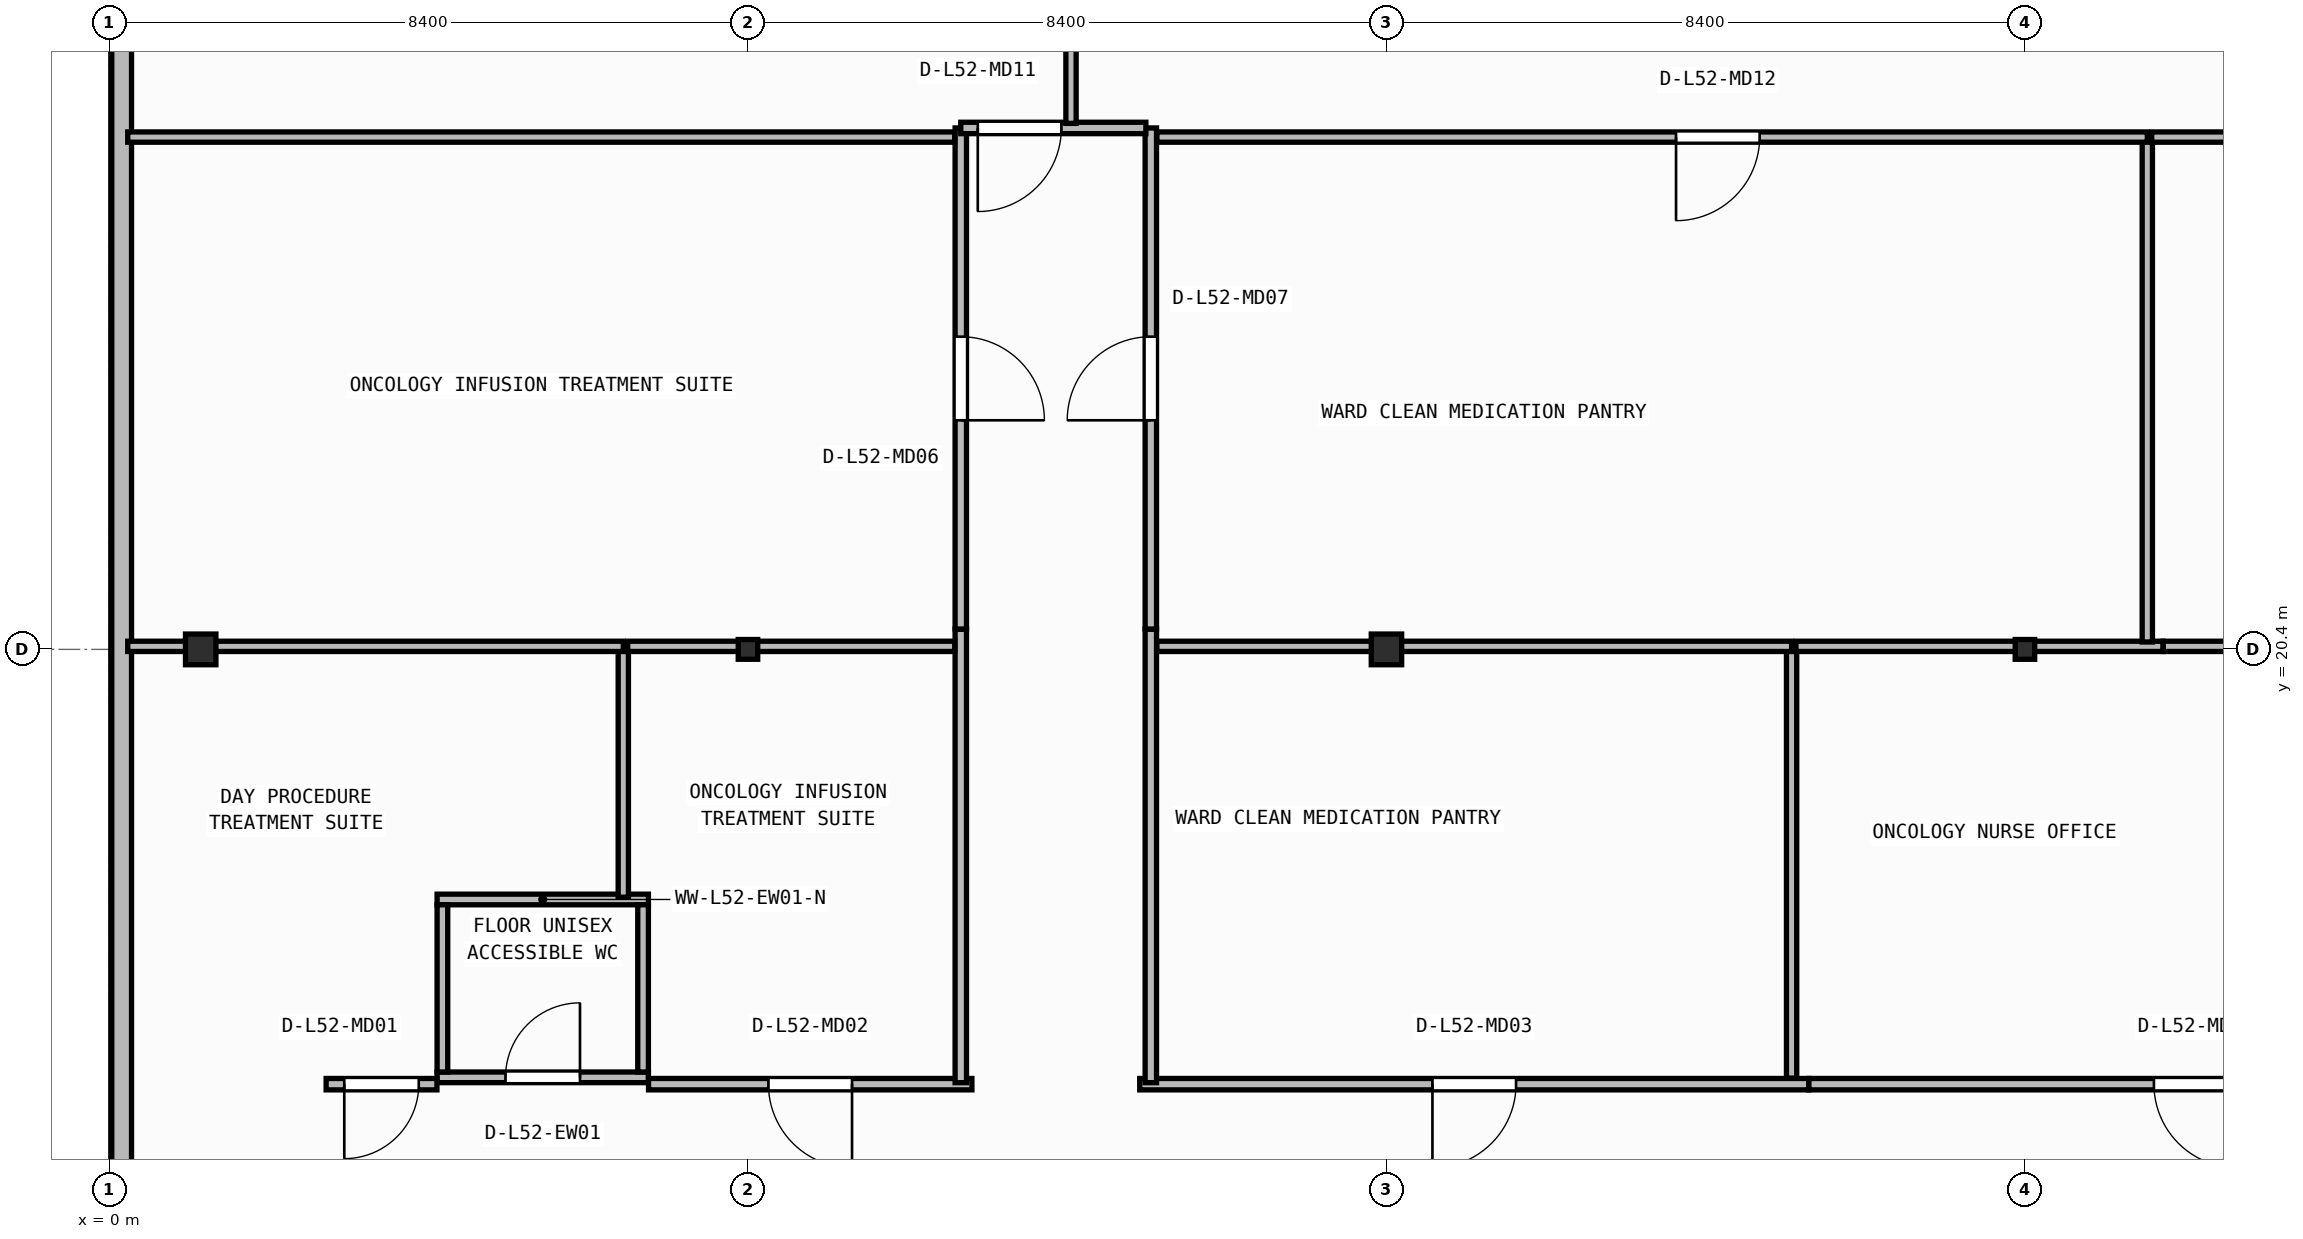
"""IFC4 building model, lengths in metres.
Left out: names, types, materials, properties, quantities, classifications, styles, units other than length and angle.
Written with IfcOpenShell. Run it as: python <this file> out.ifc"""

import sys

from ifc_helpers import new_model, si_unit, direction, frame, frame_2d, origin, origin_2d, place, context, subcontext, project, spatial, rectangle, i_section, extrude, element, fill, save


model = new_model("IFC4")
c1 = context("Model", 3, precision=1e-05, world=origin(), true_north=direction((0.0, 1.0)))
c2 = subcontext(c1, "Body", "Model", "MODEL_VIEW")
j1 = project(units=[si_unit("LENGTHUNIT", "METRE"), si_unit("PLANEANGLEUNIT", "RADIAN")], contexts=[c1])
p1 = place(None, origin())
s1 = spatial("IfcSite", under=j1, at=p1, CompositionType="ELEMENT")
p2 = place(p1, origin())
s2 = spatial("IfcBuilding", under=s1, at=p2, CompositionType="ELEMENT")
p3 = place(p2, frame((0.0, 0.0, 211.85)))
s3 = spatial("IfcBuildingStorey", under=s2, at=p3, CompositionType="ELEMENT", Elevation=211.85)
p4 = place(p3, frame((1.2, 20.4, 0.0), z_axis=(0.0, 0.0, 1.0), x_axis=(1.0, 0.0, 0.0)))
e1 = element("IfcColumn", 1, at=p4, inside=s3, PredefinedType="COLUMN", context=c2, shape_type="SweptSolid", body=[
    extrude(i_section(OverallWidth=0.4, OverallDepth=0.404, WebThickness=0.02, FlangeThickness=0.032, at=origin_2d()), origin(), (0.0, 0.0, 1.0), 3.95),
])
p5 = place(p3, frame((8.4, 20.4, 0.0), z_axis=(0.0, 0.0, 1.0), x_axis=(1.0, 0.0, 0.0)))
e2 = element("IfcColumn", 2, at=p5, inside=s3, PredefinedType="COLUMN", context=c2, shape_type="SweptSolid", body=[
    extrude(i_section(OverallWidth=0.256, OverallDepth=0.26, WebThickness=0.01, FlangeThickness=0.017, FilletRadius=0.013, at=origin_2d()), origin(), (0.0, 0.0, 1.0), 3.95),
])
p6 = place(p3, frame((16.8, 20.4, 0.0), z_axis=(0.0, 0.0, 1.0), x_axis=(1.0, 0.0, 0.0)))
e3 = element("IfcColumn", 3, at=p6, inside=s3, PredefinedType="COLUMN", context=c2, shape_type="SweptSolid", body=[
    extrude(i_section(OverallWidth=0.4, OverallDepth=0.404, WebThickness=0.02, FlangeThickness=0.032, at=origin_2d()), origin(), (0.0, 0.0, 1.0), 3.95),
])
p7 = place(p3, frame((25.2, 20.4, 0.0), z_axis=(0.0, 0.0, 1.0), x_axis=(1.0, 0.0, 0.0)))
e4 = element("IfcColumn", 4, at=p7, inside=s3, PredefinedType="COLUMN", context=c2, shape_type="SweptSolid", body=[
    extrude(i_section(OverallWidth=0.256, OverallDepth=0.26, WebThickness=0.01, FlangeThickness=0.017, FilletRadius=0.013, at=origin_2d()), origin(), (0.0, 0.0, 1.0), 3.95),
])
p8 = place(p3, frame((0.16, 40.14, 0.0), z_axis=(0.0, 0.0, 1.0), x_axis=(0.0, -1.0, 0.0)))
e5 = element("IfcWall", 5, at=p8, inside=s3, PredefinedType="STANDARD", context=c2, shape_type="SweptSolid", body=[
    extrude(rectangle(XDim=37.48, YDim=0.26, at=frame_2d((18.74, 0.0))), origin(), (0.0, 0.0, 1.0), 3.71),
])
p9 = place(p8, frame((27.4, 0.0, 0.9)))
e6 = element("IfcOpeningElement", 6, at=p9, cuts=e5, PredefinedType="OPENING", context=c2, shape_type="SweptSolid", body=[
    extrude(rectangle(XDim=2.4, YDim=1.65, at=frame_2d((1.2, 0.825))), frame((0.0, 0.14, 0.0), z_axis=(0.0, -1.0, 0.0), x_axis=(1.0, 0.0, 0.0)), (0.0, 0.0, 1.0), 0.28),
])
p10 = place(p3, frame((4.31, 14.77, 0.0), z_axis=(0.0, 0.0, 1.0), x_axis=(1.0, 0.0, 0.0)))
e7 = element("IfcWall", 7, at=p10, inside=s3, PredefinedType="PARTITIONING", context=c2, shape_type="SweptSolid", body=[
    extrude(rectangle(XDim=2.78, YDim=0.14, at=frame_2d((1.39, 0.0))), origin(), (0.0, 0.0, 1.0), 3.71),
])
p11 = place(p10, frame((0.9, 0.0, 0.0)))
e8 = element("IfcOpeningElement", 8, at=p11, cuts=e7, PredefinedType="OPENING", context=c2, shape_type="SweptSolid", body=[
    extrude(rectangle(XDim=0.98, YDim=2.1, at=frame_2d((0.49, 1.05))), frame((0.0, 0.08, 0.0), z_axis=(0.0, -1.0, 0.0), x_axis=(1.0, 0.0, 0.0)), (0.0, 0.0, 1.0), 0.16),
])
p12 = place(p3, frame((4.31, 17.11, 0.0), z_axis=(0.0, 0.0, 1.0), x_axis=(1.0, 0.0, 0.0)))
e9 = element("IfcWall", 9, at=p12, inside=s3, PredefinedType="PARTITIONING", context=c2, shape_type="SweptSolid", body=[
    extrude(rectangle(XDim=2.78, YDim=0.14, at=frame_2d((1.39, 0.0))), origin(), (0.0, 0.0, 1.0), 3.71),
])
for number, where, z_axis, x_axis in (
    (10, (4.38, 14.84, 0.0), (0.0, 0.0, 1.0), (0.0, 1.0, 0.0)),
    (11, (7.02, 14.84, 0.0), (0.0, 0.0, 1.0), (0.0, 1.0, 0.0)),
):
    element("IfcWall", number, at=place(p3, frame(where, z_axis=z_axis, x_axis=x_axis)), inside=s3, PredefinedType="PARTITIONING", context=c2, shape_type="SweptSolid", body=[
        extrude(rectangle(XDim=2.2, YDim=0.14, at=frame_2d((1.1, 0.0))), origin(), (0.0, 0.0, 1.0), 3.71),
    ])
p13 = place(p3, frame((4.308, 14.68, 0.0), z_axis=(0.0, 0.0, 1.0), x_axis=(-1.0, 0.0, 0.0)))
e12 = element("IfcWall", 12, at=p13, inside=s3, PredefinedType="PARTITIONING", context=c2, shape_type="SweptSolid", body=[
    extrude(rectangle(XDim=1.458, YDim=0.15, at=frame_2d((0.729, 0.0))), origin(), (0.0, 0.0, 1.0), 3.71),
])
p14 = place(p13, frame((0.239, 0.0, 0.0)))
e13 = element("IfcOpeningElement", 13, at=p14, cuts=e12, PredefinedType="OPENING", context=c2, shape_type="SweptSolid", body=[
    extrude(rectangle(XDim=0.98, YDim=2.1, at=frame_2d((0.49, 1.05))), frame((0.0, 0.085, 0.0), z_axis=(0.0, -1.0, 0.0), x_axis=(1.0, 0.0, 0.0)), (0.0, 0.0, 1.0), 0.17),
])
p15 = place(p3, frame((11.346, 14.68, 0.0), z_axis=(0.0, 0.0, 1.0), x_axis=(-1.0, 0.0, 0.0)))
e14 = element("IfcWall", 14, at=p15, inside=s3, PredefinedType="PARTITIONING", context=c2, shape_type="SweptSolid", body=[
    extrude(rectangle(XDim=4.254, YDim=0.15, at=frame_2d((2.127, 0.0))), origin(), (0.0, 0.0, 1.0), 3.71),
])
p16 = place(p15, frame((1.577, 0.0, 0.0)))
e15 = element("IfcOpeningElement", 15, at=p16, cuts=e14, PredefinedType="OPENING", context=c2, shape_type="SweptSolid", body=[
    extrude(rectangle(XDim=1.1, YDim=2.1, at=frame_2d((0.55, 1.05))), frame((0.0, 0.085, 0.0), z_axis=(0.0, -1.0, 0.0), x_axis=(1.0, 0.0, 0.0)), (0.0, 0.0, 1.0), 0.17),
])
p17 = place(p3, frame((22.356, 14.68, 0.0), z_axis=(0.0, 0.0, 1.0), x_axis=(-1.0, 0.0, 0.0)))
e16 = element("IfcWall", 16, at=p17, inside=s3, PredefinedType="PARTITIONING", context=c2, shape_type="SweptSolid", body=[
    extrude(rectangle(XDim=8.802, YDim=0.15, at=frame_2d((4.401, 0.0))), origin(), (0.0, 0.0, 1.0), 3.71),
])
p18 = place(p17, frame((3.851, 0.0, 0.0)))
e17 = element("IfcOpeningElement", 17, at=p18, cuts=e16, PredefinedType="OPENING", context=c2, shape_type="SweptSolid", body=[
    extrude(rectangle(XDim=1.1, YDim=2.1, at=frame_2d((0.55, 1.05))), frame((0.0, 0.085, 0.0), z_axis=(0.0, -1.0, 0.0), x_axis=(1.0, 0.0, 0.0)), (0.0, 0.0, 1.0), 0.17),
])
p19 = place(p3, frame((32.536, 14.68, 0.0), z_axis=(0.0, 0.0, 1.0), x_axis=(-1.0, 0.0, 0.0)))
e18 = element("IfcWall", 18, at=p19, inside=s3, PredefinedType="PARTITIONING", context=c2, shape_type="SweptSolid", body=[
    extrude(rectangle(XDim=10.178, YDim=0.15, at=frame_2d((5.089, 0.0))), origin(), (0.0, 0.0, 1.0), 3.71),
])
p20 = place(p19, frame((4.539, 0.0, 0.0)))
e19 = element("IfcOpeningElement", 19, at=p20, cuts=e18, PredefinedType="OPENING", context=c2, shape_type="SweptSolid", body=[
    extrude(rectangle(XDim=1.1, YDim=2.1, at=frame_2d((0.55, 1.05))), frame((0.0, 0.085, 0.0), z_axis=(0.0, -1.0, 0.0), x_axis=(1.0, 0.0, 0.0)), (0.0, 0.0, 1.0), 0.17),
])
for number, where, z_axis, x_axis in (
    (20, (11.2, 20.666, 0.0), (0.0, 0.0, 1.0), (0.0, -1.0, 0.0)),
    (21, (13.7, 14.7, 0.0), (0.0, 0.0, 1.0), (0.0, 1.0, 0.0)),
):
    element("IfcWall", number, at=place(p3, frame(where, z_axis=z_axis, x_axis=x_axis)), inside=s3, PredefinedType="PARTITIONING", context=c2, shape_type="SweptSolid", body=[
        extrude(rectangle(XDim=5.966, YDim=0.15, at=frame_2d((2.983, 0.0))), origin(), (0.0, 0.0, 1.0), 3.71),
    ])
p21 = place(p3, frame((11.2, 27.26, 0.0), z_axis=(0.0, 0.0, 1.0), x_axis=(0.0, -1.0, 0.0)))
e22 = element("IfcWall", 22, at=p21, inside=s3, PredefinedType="PARTITIONING", context=c2, shape_type="SweptSolid", body=[
    extrude(rectangle(XDim=6.592, YDim=0.15, at=frame_2d((3.296, 0.0))), origin(), (0.0, 0.0, 1.0), 3.71),
])
p22 = place(p21, frame((2.746, 0.0, 0.0)))
e23 = element("IfcOpeningElement", 23, at=p22, cuts=e22, PredefinedType="OPENING", context=c2, shape_type="SweptSolid", body=[
    extrude(rectangle(XDim=1.1, YDim=2.1, at=frame_2d((0.55, 1.05))), frame((0.0, 0.085, 0.0), z_axis=(0.0, -1.0, 0.0), x_axis=(1.0, 0.0, 0.0)), (0.0, 0.0, 1.0), 0.17),
])
p23 = place(p3, frame((13.7, 20.668, 0.0), z_axis=(0.0, 0.0, 1.0), x_axis=(0.0, 1.0, 0.0)))
e24 = element("IfcWall", 24, at=p23, inside=s3, PredefinedType="PARTITIONING", context=c2, shape_type="SweptSolid", body=[
    extrude(rectangle(XDim=6.592, YDim=0.15, at=frame_2d((3.296, 0.0))), origin(), (0.0, 0.0, 1.0), 3.71),
])
p24 = place(p23, frame((2.746, 0.0, 0.0)))
e25 = element("IfcOpeningElement", 25, at=p24, cuts=e24, PredefinedType="OPENING", context=c2, shape_type="SweptSolid", body=[
    extrude(rectangle(XDim=1.1, YDim=2.1, at=frame_2d((0.55, 1.05))), frame((0.0, 0.085, 0.0), z_axis=(0.0, -1.0, 0.0), x_axis=(1.0, 0.0, 0.0)), (0.0, 0.0, 1.0), 0.17),
])
p25 = place(p3, frame((13.635, 27.26, 0.0), z_axis=(0.0, 0.0, 1.0), x_axis=(-1.0, 0.0, 0.0)))
e26 = element("IfcWall", 26, at=p25, inside=s3, PredefinedType="PARTITIONING", context=c2, shape_type="SweptSolid", body=[
    extrude(rectangle(XDim=2.435, YDim=0.15, at=frame_2d((1.218, 0.0))), origin(), (0.0, 0.0, 1.0), 3.71),
])
p26 = place(p25, frame((1.112, 0.0, 0.0)))
e27 = element("IfcOpeningElement", 27, at=p26, cuts=e26, PredefinedType="OPENING", context=c2, shape_type="SweptSolid", body=[
    extrude(rectangle(XDim=1.1, YDim=2.1, at=frame_2d((0.55, 1.05))), frame((0.0, 0.085, 0.0), z_axis=(0.0, -1.0, 0.0), x_axis=(1.0, 0.0, 0.0)), (0.0, 0.0, 1.0), 0.17),
])
p27 = place(p3, frame((6.76, 17.14, 0.0), z_axis=(0.0, 0.0, 1.0), x_axis=(0.0, 1.0, 0.0)))
e28 = element("IfcWall", 28, at=p27, inside=s3, PredefinedType="PARTITIONING", context=c2, shape_type="SweptSolid", body=[
    extrude(rectangle(XDim=3.3, YDim=0.135, at=frame_2d((1.65, 0.0))), origin(), (0.0, 0.0, 1.0), 3.71),
])
p28 = place(p3, frame((6.76, 20.44, 0.0), z_axis=(0.0, 0.0, 1.0), x_axis=(-1.0, 0.0, 0.0)))
e29 = element("IfcWall", 29, at=p28, inside=s3, PredefinedType="PARTITIONING", context=c2, shape_type="SweptSolid", body=[
    extrude(rectangle(XDim=6.52, YDim=0.135, at=frame_2d((3.26, 0.0))), origin(), (0.0, 0.0, 1.0), 3.152),
])
p29 = place(p3, frame((11.12, 20.44, 0.0), z_axis=(0.0, 0.0, 1.0), x_axis=(-1.0, 0.0, 0.0)))
e30 = element("IfcWall", 30, at=p29, inside=s3, PredefinedType="PARTITIONING", context=c2, shape_type="SweptSolid", body=[
    extrude(rectangle(XDim=4.303, YDim=0.135, at=frame_2d((2.151, 0.0))), origin(), (0.0, 0.0, 1.0), 3.152),
])
p30 = place(p3, frame((22.13, 14.76, 0.0), z_axis=(0.0, 0.0, 1.0), x_axis=(0.0, 1.0, 0.0)))
e31 = element("IfcWall", 31, at=p30, inside=s3, PredefinedType="PARTITIONING", context=c2, shape_type="SweptSolid", body=[
    extrude(rectangle(XDim=5.68, YDim=0.135, at=frame_2d((2.84, 0.0))), origin(), (0.0, 0.0, 1.0), 3.71),
])
p31 = place(p3, frame((22.13, 20.44, 0.0), z_axis=(0.0, 0.0, 1.0), x_axis=(-1.0, 0.0, 0.0)))
e32 = element("IfcWall", 32, at=p31, inside=s3, PredefinedType="PARTITIONING", context=c2, shape_type="SweptSolid", body=[
    extrude(rectangle(XDim=8.35, YDim=0.135, at=frame_2d((4.175, 0.0))), origin(), (0.0, 0.0, 1.0), 3.152),
])
p32 = place(p3, frame((27.018, 20.44, 0.0), z_axis=(0.0, 0.0, 1.0), x_axis=(-1.0, 0.0, 0.0)))
e33 = element("IfcWall", 33, at=p32, inside=s3, PredefinedType="PARTITIONING", context=c2, shape_type="SweptSolid", body=[
    extrude(rectangle(XDim=4.83, YDim=0.135, at=frame_2d((2.415, 0.0))), origin(), (0.0, 0.0, 1.0), 3.152),
])
p33 = place(p3, frame((32.31, 20.44, 0.0), z_axis=(0.0, 0.0, 1.0), x_axis=(-1.0, 0.0, 0.0)))
e34 = element("IfcWall", 34, at=p33, inside=s3, PredefinedType="PARTITIONING", context=c2, shape_type="SweptSolid", body=[
    extrude(rectangle(XDim=5.291, YDim=0.135, at=frame_2d((2.645, 0.0))), origin(), (0.0, 0.0, 1.0), 3.152),
])
p34 = place(p33, frame((2.379, 0.0, 0.0)))
e35 = element("IfcOpeningElement", 35, at=p34, cuts=e34, PredefinedType="OPENING", context=c2, shape_type="SweptSolid", body=[
    extrude(rectangle(XDim=1.1, YDim=2.1, at=frame_2d((0.55, 1.05))), frame((0.0, 0.077, 0.0), z_axis=(0.0, -1.0, 0.0), x_axis=(1.0, 0.0, 0.0)), (0.0, 0.0, 1.0), 0.155),
])
p35 = place(p3, frame((11.12, 27.14, 0.0), z_axis=(0.0, 0.0, 1.0), x_axis=(-1.0, 0.0, 0.0)))
e36 = element("IfcWall", 36, at=p35, inside=s3, PredefinedType="PARTITIONING", context=c2, shape_type="SweptSolid", body=[
    extrude(rectangle(XDim=10.88, YDim=0.135, at=frame_2d((5.44, 0.0))), origin(), (0.0, 0.0, 1.0), 3.71),
])
p36 = place(p3, frame((26.81, 20.498, 0.0), z_axis=(0.0, 0.0, 1.0), x_axis=(0.0, 1.0, 0.0)))
e37 = element("IfcWall", 37, at=p36, inside=s3, PredefinedType="PARTITIONING", context=c2, shape_type="SweptSolid", body=[
    extrude(rectangle(XDim=6.642, YDim=0.135, at=frame_2d((3.321, 0.0))), origin(), (0.0, 0.0, 1.0), 3.71),
])
p37 = place(p3, frame((26.81, 27.14, 0.0), z_axis=(0.0, 0.0, 1.0), x_axis=(-1.0, 0.0, 0.0)))
e38 = element("IfcWall", 38, at=p37, inside=s3, PredefinedType="PARTITIONING", context=c2, shape_type="SweptSolid", body=[
    extrude(rectangle(XDim=13.03, YDim=0.135, at=frame_2d((6.515, 0.0))), origin(), (0.0, 0.0, 1.0), 3.71),
])
p38 = place(p37, frame((5.1, 0.0, 0.0)))
e39 = element("IfcOpeningElement", 39, at=p38, cuts=e38, PredefinedType="OPENING", context=c2, shape_type="SweptSolid", body=[
    extrude(rectangle(XDim=1.1, YDim=2.1, at=frame_2d((0.55, 1.05))), frame((0.0, 0.077, 0.0), z_axis=(0.0, -1.0, 0.0), x_axis=(1.0, 0.0, 0.0)), (0.0, 0.0, 1.0), 0.155),
])
p39 = place(p3, frame((28.988, 27.14, 0.0), z_axis=(0.0, 0.0, 1.0), x_axis=(-1.0, 0.0, 0.0)))
e40 = element("IfcWall", 40, at=p39, inside=s3, PredefinedType="PARTITIONING", context=c2, shape_type="SweptSolid", body=[
    extrude(rectangle(XDim=2.12, YDim=0.135, at=frame_2d((1.06, 0.0))), origin(), (0.0, 0.0, 1.0), 3.71),
])
p40 = place(p3, frame((12.65, 27.32, 0.0), z_axis=(0.0, 0.0, 1.0), x_axis=(0.0, 1.0, 0.0)))
e41 = element("IfcWall", 41, at=p40, inside=s3, PredefinedType="PARTITIONING", context=c2, shape_type="SweptSolid", body=[
    extrude(rectangle(XDim=8.724, YDim=0.135, at=frame_2d((4.362, 0.0))), origin(), (0.0, 0.0, 1.0), 3.71),
])
p41 = place(p11, origin())
e42 = element("IfcDoor", 42, at=p41, inside=s3, OperationType="SINGLE_SWING_RIGHT", PredefinedType="DOOR", context=c2, shape_type="SweptSolid", body=[
    extrude(rectangle(XDim=0.98, YDim=2.1, at=frame_2d((0.49, 1.05))), frame((0.0, 0.025, 0.0), z_axis=(0.0, -1.0, 0.0), x_axis=(1.0, 0.0, 0.0)), (0.0, 0.0, 1.0), 0.05),
])
fill(e8, e42)
p42 = place(p14, origin())
e43 = element("IfcDoor", 43, at=p42, inside=s3, OperationType="SINGLE_SWING_RIGHT", PredefinedType="DOOR", context=c2, shape_type="SweptSolid", body=[
    extrude(rectangle(XDim=0.98, YDim=2.1, at=frame_2d((0.49, 1.05))), frame((0.0, 0.025, 0.0), z_axis=(0.0, -1.0, 0.0), x_axis=(1.0, 0.0, 0.0)), (0.0, 0.0, 1.0), 0.05),
])
fill(e13, e43)
p43 = place(p16, origin())
e44 = element("IfcDoor", 44, at=p43, inside=s3, OperationType="SINGLE_SWING_LEFT", PredefinedType="DOOR", context=c2, shape_type="SweptSolid", body=[
    extrude(rectangle(XDim=1.1, YDim=2.1, at=frame_2d((0.55, 1.05))), frame((0.0, 0.025, 0.0), z_axis=(0.0, -1.0, 0.0), x_axis=(1.0, 0.0, 0.0)), (0.0, 0.0, 1.0), 0.05),
])
fill(e15, e44)
p44 = place(p18, origin())
e45 = element("IfcDoor", 45, at=p44, inside=s3, OperationType="SINGLE_SWING_RIGHT", PredefinedType="DOOR", context=c2, shape_type="SweptSolid", body=[
    extrude(rectangle(XDim=1.1, YDim=2.1, at=frame_2d((0.55, 1.05))), frame((0.0, 0.025, 0.0), z_axis=(0.0, -1.0, 0.0), x_axis=(1.0, 0.0, 0.0)), (0.0, 0.0, 1.0), 0.05),
])
fill(e17, e45)
p45 = place(p20, origin())
e46 = element("IfcDoor", 46, at=p45, inside=s3, OperationType="SINGLE_SWING_LEFT", PredefinedType="DOOR", context=c2, shape_type="SweptSolid", body=[
    extrude(rectangle(XDim=1.1, YDim=2.1, at=frame_2d((0.55, 1.05))), frame((0.0, 0.025, 0.0), z_axis=(0.0, -1.0, 0.0), x_axis=(1.0, 0.0, 0.0)), (0.0, 0.0, 1.0), 0.05),
])
fill(e19, e46)
p46 = place(p22, origin())
e47 = element("IfcDoor", 47, at=p46, inside=s3, OperationType="SINGLE_SWING_RIGHT", PredefinedType="DOOR", context=c2, shape_type="SweptSolid", body=[
    extrude(rectangle(XDim=1.1, YDim=2.1, at=frame_2d((0.55, 1.05))), frame((0.0, 0.025, 0.0), z_axis=(0.0, -1.0, 0.0), x_axis=(1.0, 0.0, 0.0)), (0.0, 0.0, 1.0), 0.05),
])
fill(e23, e47)
p47 = place(p24, origin())
e48 = element("IfcDoor", 48, at=p47, inside=s3, OperationType="SINGLE_SWING_LEFT", PredefinedType="DOOR", context=c2, shape_type="SweptSolid", body=[
    extrude(rectangle(XDim=1.1, YDim=2.1, at=frame_2d((0.55, 1.05))), frame((0.0, 0.025, 0.0), z_axis=(0.0, -1.0, 0.0), x_axis=(1.0, 0.0, 0.0)), (0.0, 0.0, 1.0), 0.05),
])
fill(e25, e48)
p48 = place(p26, origin())
e49 = element("IfcDoor", 49, at=p48, inside=s3, OperationType="SINGLE_SWING_RIGHT", PredefinedType="DOOR", context=c2, shape_type="SweptSolid", body=[
    extrude(rectangle(XDim=1.1, YDim=2.1, at=frame_2d((0.55, 1.05))), frame((0.0, 0.025, 0.0), z_axis=(0.0, -1.0, 0.0), x_axis=(1.0, 0.0, 0.0)), (0.0, 0.0, 1.0), 0.05),
])
fill(e27, e49)
p49 = place(p38, origin())
e50 = element("IfcDoor", 50, at=p49, inside=s3, OperationType="SINGLE_SWING_RIGHT", PredefinedType="DOOR", context=c2, shape_type="SweptSolid", body=[
    extrude(rectangle(XDim=1.1, YDim=2.1, at=frame_2d((0.55, 1.05))), frame((0.0, 0.025, 0.0), z_axis=(0.0, -1.0, 0.0), x_axis=(1.0, 0.0, 0.0)), (0.0, 0.0, 1.0), 0.05),
])
fill(e39, e50)
save(model, sys.argv[1])
